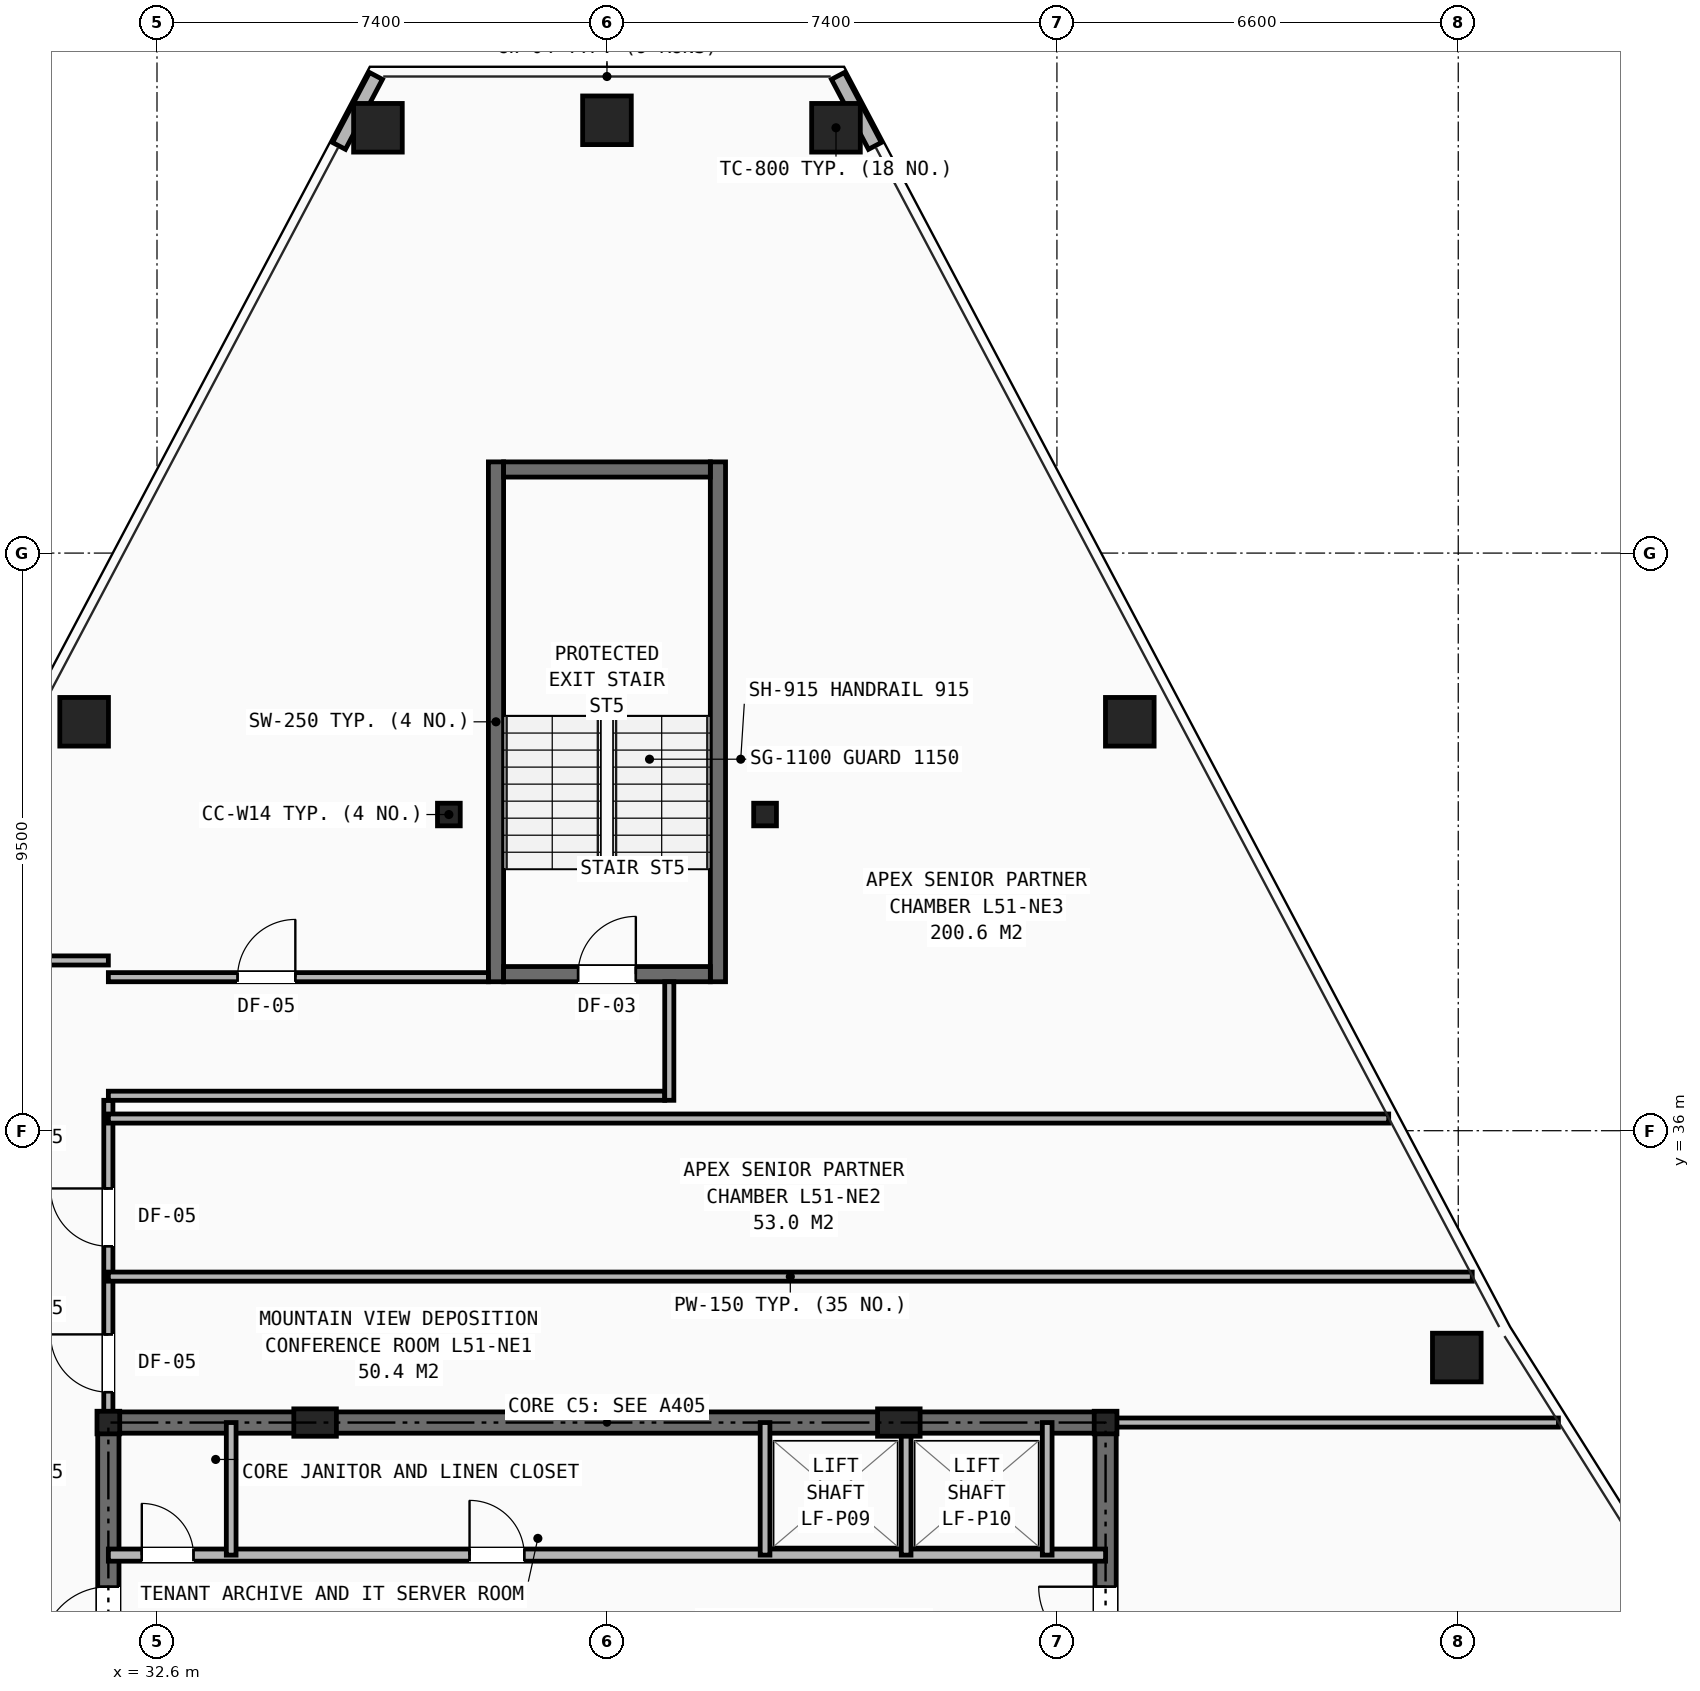
"""IFC4 building model, lengths in metres.
Left out: names, types, materials, properties, quantities, classifications, styles, units other than length and angle.
Written with IfcOpenShell. Run it as: python <this file> out.ifc"""

import sys

from ifc_helpers import new_model, si_unit, direction, frame, frame_2d, origin, origin_2d, place, context, subcontext, project, spatial, rectangle, hollow_rectangle, i_section, extrude, element, fill, save


model = new_model("IFC4")
c1 = context("Model", 3, precision=1e-05, world=origin(), true_north=direction((0.0, 1.0)))
c2 = subcontext(c1, "Body", "Model", "MODEL_VIEW")
j1 = project(units=[si_unit("LENGTHUNIT", "METRE"), si_unit("PLANEANGLEUNIT", "RADIAN")], contexts=[c1])
p1 = place(None, origin())
s1 = spatial("IfcSite", under=j1, at=p1, CompositionType="ELEMENT")
p2 = place(p1, origin())
s2 = spatial("IfcBuilding", under=s1, at=p2, CompositionType="ELEMENT")
p3 = place(p2, frame((0.0, 0.0, 179.25)))
s3 = spatial("IfcBuildingStorey", under=s2, at=p3, CompositionType="ELEMENT", Elevation=179.25)
for number, where, z_axis, x_axis in (
    (1, (31.8, 31.2, 0.0), (0.0, 0.0, 1.0), (1.0, 0.0, 0.0)),
    (2, (48.2, 31.2, 0.0), (0.0, 0.0, 1.0), (1.0, 0.0, 0.0)),
    (3, (37.4, 41.2, 0.0), (0.0, 0.0, 1.0), (1.0, 0.0, 0.0)),
    (4, (42.6, 41.2, 0.0), (0.0, 0.0, 1.0), (1.0, 0.0, 0.0)),
):
    element("IfcColumn", number, at=place(p3, frame(where, z_axis=z_axis, x_axis=x_axis)), inside=s3, PredefinedType="COLUMN", context=c2, shape_type="SweptSolid", body=[
        extrude(i_section(OverallWidth=0.374, OverallDepth=0.372, WebThickness=0.016, FlangeThickness=0.026, at=origin_2d()), origin(), (0.0, 0.0, 1.0), 3.45),
    ])
for number, where, z_axis, x_axis in (
    (5, (35.2, 31.2, 0.0), (0.0, 0.0, 1.0), (1.0, 0.0, 0.0)),
    (6, (44.8, 31.2, 0.0), (0.0, 0.0, 1.0), (1.0, 0.0, 0.0)),
):
    element("IfcColumn", number, at=place(p3, frame(where, z_axis=z_axis, x_axis=x_axis)), inside=s3, PredefinedType="PILASTER", context=c2, shape_type="SweptSolid", body=[
        extrude(rectangle(XDim=0.7, YDim=0.45, at=origin_2d()), origin(), (0.0, 0.0, 1.0), 3.45),
    ])
for number, where, z_axis, x_axis in (
    (7, (43.767, 52.495, 0.0), (0.0, 0.0, 1.0), (1.0, 0.0, 0.0)),
    (8, (40.0, 52.618, 0.0), (0.0, 0.0, 1.0), (1.0, 0.0, 0.0)),
    (9, (36.233, 52.495, 0.0), (0.0, 0.0, 1.0), (1.0, 0.0, 0.0)),
    (10, (31.402, 42.726, 0.0), (0.0, 0.0, 1.0), (1.0, 0.0, 0.0)),
    (11, (53.976, 32.269, 0.0), (0.0, 0.0, 1.0), (1.0, 0.0, 0.0)),
    (12, (48.598, 42.726, 0.0), (0.0, 0.0, 1.0), (1.0, 0.0, 0.0)),
):
    element("IfcColumn", number, at=place(p3, frame(where, z_axis=z_axis, x_axis=x_axis)), inside=s3, PredefinedType="COLUMN", context=c2, shape_type="SweptSolid", body=[
        extrude(hollow_rectangle(XDim=0.8, YDim=0.8, WallThickness=0.055, at=origin_2d()), origin(), (0.0, 0.0, 1.0), 3.45),
    ])
for number, where, z_axis, x_axis in (
    (13, (36.201, 53.347, 0.0), (0.0, 0.0, 1.0), (-0.467, -0.884, 0.0)),
    (14, (44.407, 52.197, 0.0), (0.0, 0.0, 1.0), (-0.467, 0.884, 0.0)),
):
    element("IfcWall", number, at=place(p3, frame(where, z_axis=z_axis, x_axis=x_axis)), inside=s3, PredefinedType="SHEAR", context=c2, shape_type="SweptSolid", body=[
        extrude(rectangle(XDim=1.302, YDim=0.24, at=frame_2d((0.651, 0.0))), origin(), (0.0, 0.0, 1.0), 2.583),
    ])
p4 = place(p3, frame((31.8, 31.2, 0.0), z_axis=(0.0, 0.0, 1.0), x_axis=(1.0, 0.0, 0.0)))
e15 = element("IfcWall", 15, at=p4, inside=s3, PredefinedType="SHEAR", context=c2, shape_type="SweptSolid", body=[
    extrude(rectangle(XDim=16.4, YDim=0.35, at=frame_2d((8.2, 0.0))), origin(), (0.0, 0.0, 1.0), 3.21),
])
p5 = place(p3, frame((31.8, 16.4, 0.0), z_axis=(0.0, 0.0, 1.0), x_axis=(0.0, 1.0, 0.0)))
e16 = element("IfcWall", 16, at=p5, inside=s3, PredefinedType="SHEAR", context=c2, shape_type="SweptSolid", body=[
    extrude(rectangle(XDim=14.8, YDim=0.35, at=frame_2d((7.4, 0.0))), origin(), (0.0, 0.0, 1.0), 3.21),
])
p6 = place(p5, frame((11.0, 0.0, 0.0)))
e17 = element("IfcOpeningElement", 17, at=p6, cuts=e16, PredefinedType="OPENING", context=c2, shape_type="SweptSolid", body=[
    extrude(rectangle(XDim=1.1, YDim=2.15, at=frame_2d((0.55, 1.075))), frame((0.0, 0.185, 0.0), z_axis=(0.0, -1.0, 0.0), x_axis=(1.0, 0.0, 0.0)), (0.0, 0.0, 1.0), 0.37),
])
p7 = place(p3, frame((48.2, 16.4, 0.0), z_axis=(0.0, 0.0, 1.0), x_axis=(0.0, 1.0, 0.0)))
e18 = element("IfcWall", 18, at=p7, inside=s3, PredefinedType="SHEAR", context=c2, shape_type="SweptSolid", body=[
    extrude(rectangle(XDim=14.8, YDim=0.35, at=frame_2d((7.4, 0.0))), origin(), (0.0, 0.0, 1.0), 3.21),
])
p8 = place(p7, frame((11.0, 0.0, 0.0)))
e19 = element("IfcOpeningElement", 19, at=p8, cuts=e18, PredefinedType="OPENING", context=c2, shape_type="SweptSolid", body=[
    extrude(rectangle(XDim=1.1, YDim=2.15, at=frame_2d((0.55, 1.075))), frame((0.0, 0.185, 0.0), z_axis=(0.0, -1.0, 0.0), x_axis=(1.0, 0.0, 0.0)), (0.0, 0.0, 1.0), 0.37),
])
p9 = place(p3, frame((31.8, 29.02, 0.0), z_axis=(0.0, 0.0, 1.0), x_axis=(1.0, 0.0, 0.0)))
e20 = element("IfcWall", 20, at=p9, inside=s3, PredefinedType="SOLIDWALL", context=c2, shape_type="SweptSolid", body=[
    extrude(rectangle(XDim=16.4, YDim=0.2, at=frame_2d((8.2, 0.0))), origin(), (0.0, 0.0, 1.0), 2.665),
])
p10 = place(p9, frame((0.55, 0.0, 0.0)))
e21 = element("IfcOpeningElement", 21, at=p10, cuts=e20, PredefinedType="OPENING", context=c2, shape_type="SweptSolid", body=[
    extrude(rectangle(XDim=0.85, YDim=2.05, at=frame_2d((0.425, 1.025))), frame((0.0, 0.11, 0.0), z_axis=(0.0, -1.0, 0.0), x_axis=(1.0, 0.0, 0.0)), (0.0, 0.0, 1.0), 0.22),
])
p11 = place(p9, frame((5.94, 0.0, 0.0)))
e22 = element("IfcOpeningElement", 22, at=p11, cuts=e20, PredefinedType="OPENING", context=c2, shape_type="SweptSolid", body=[
    extrude(rectangle(XDim=0.9, YDim=2.1, at=frame_2d((0.45, 1.05))), frame((0.0, 0.11, 0.0), z_axis=(0.0, -1.0, 0.0), x_axis=(1.0, 0.0, 0.0)), (0.0, 0.0, 1.0), 0.22),
])
for number, where, z_axis, x_axis in (
    (23, (33.82, 29.02, 0.0), (0.0, 0.0, 1.0), (0.0, 1.0, 0.0)),
    (24, (42.6, 29.02, 0.0), (0.0, 0.0, 1.0), (0.0, 1.0, 0.0)),
    (25, (44.92, 29.02, 0.0), (0.0, 0.0, 1.0), (0.0, 1.0, 0.0)),
    (26, (47.24, 29.02, 0.0), (0.0, 0.0, 1.0), (0.0, 1.0, 0.0)),
):
    element("IfcWall", number, at=place(p3, frame(where, z_axis=z_axis, x_axis=x_axis)), inside=s3, PredefinedType="SOLIDWALL", context=c2, shape_type="SweptSolid", body=[
        extrude(rectangle(XDim=2.18, YDim=0.16, at=frame_2d((1.09, 0.0))), origin(), (0.0, 0.0, 1.0), 2.665),
    ])
p12 = place(p3, frame((31.8, 31.2, 0.0), z_axis=(0.0, 0.0, 1.0), x_axis=(0.0, 1.0, 0.0)))
e27 = element("IfcWall", 27, at=p12, inside=s3, PredefinedType="PARTITIONING", context=c2, shape_type="SweptSolid", body=[
    extrude(rectangle(XDim=5.3, YDim=0.15, at=frame_2d((2.65, 0.0))), origin(), (0.0, 0.0, 1.0), 2.225),
])
p13 = place(p12, frame((0.5, 0.0, 0.0)))
e28 = element("IfcOpeningElement", 28, at=p13, cuts=e27, PredefinedType="OPENING", context=c2, shape_type="SweptSolid", body=[
    extrude(rectangle(XDim=0.95, YDim=2.1, at=frame_2d((0.475, 1.05))), frame((0.0, 0.085, 0.0), z_axis=(0.0, -1.0, 0.0), x_axis=(1.0, 0.0, 0.0)), (0.0, 0.0, 1.0), 0.17),
])
p14 = place(p12, frame((2.9, 0.0, 0.0)))
e29 = element("IfcOpeningElement", 29, at=p14, cuts=e27, PredefinedType="OPENING", context=c2, shape_type="SweptSolid", body=[
    extrude(rectangle(XDim=0.95, YDim=2.1, at=frame_2d((0.475, 1.05))), frame((0.0, 0.085, 0.0), z_axis=(0.0, -1.0, 0.0), x_axis=(1.0, 0.0, 0.0)), (0.0, 0.0, 1.0), 0.17),
])
p15 = place(p3, frame((29.6, 38.8, 0.0), z_axis=(0.0, 0.0, 1.0), x_axis=(1.0, 0.0, 0.0)))
e30 = element("IfcWall", 30, at=p15, inside=s3, PredefinedType="PARTITIONING", context=c2, shape_type="SweptSolid", body=[
    extrude(rectangle(XDim=2.2, YDim=0.15, at=frame_2d((1.1, 0.0))), origin(), (0.0, 0.0, 1.0), 2.589),
])
p16 = place(p3, frame((48.2, 31.2, 0.0), z_axis=(0.0, 0.0, 1.0), x_axis=(1.0, 0.0, 0.0)))
e31 = element("IfcWall", 31, at=p16, inside=s3, PredefinedType="PARTITIONING", context=c2, shape_type="SweptSolid", body=[
    extrude(rectangle(XDim=7.448, YDim=0.15, at=frame_2d((3.724, 0.0))), origin(), (0.0, 0.0, 1.0), 2.225),
])
p17 = place(p3, frame((31.8, 33.6, 0.0), z_axis=(0.0, 0.0, 1.0), x_axis=(1.0, 0.0, 0.0)))
e32 = element("IfcWall", 32, at=p17, inside=s3, PredefinedType="PARTITIONING", context=c2, shape_type="SweptSolid", body=[
    extrude(rectangle(XDim=22.43, YDim=0.15, at=frame_2d((11.215, 0.0))), origin(), (0.0, 0.0, 1.0), 2.589),
])
p18 = place(p3, frame((31.8, 36.2, 0.0), z_axis=(0.0, 0.0, 1.0), x_axis=(1.0, 0.0, 0.0)))
e33 = element("IfcWall", 33, at=p18, inside=s3, PredefinedType="PARTITIONING", context=c2, shape_type="SweptSolid", body=[
    extrude(rectangle(XDim=21.056, YDim=0.15, at=frame_2d((10.528, 0.0))), origin(), (0.0, 0.0, 1.0), 2.589),
])
for number, where, z_axis, x_axis in (
    (34, (38.175, 38.45, 0.0), (0.0, 0.0, 1.0), (0.0, 1.0, 0.0)),
    (35, (41.825, 38.45, 0.0), (0.0, 0.0, 1.0), (0.0, 1.0, 0.0)),
):
    element("IfcWall", number, at=place(p3, frame(where, z_axis=z_axis, x_axis=x_axis)), inside=s3, PredefinedType="SHEAR", context=c2, shape_type="SweptSolid", body=[
        extrude(rectangle(XDim=8.55, YDim=0.25, at=frame_2d((4.275, 0.0))), origin(), (0.0, 0.0, 1.0), 3.21),
    ])
p19 = place(p3, frame((38.3, 38.575, 0.0), z_axis=(0.0, 0.0, 1.0), x_axis=(1.0, 0.0, 0.0)))
e36 = element("IfcWall", 36, at=p19, inside=s3, PredefinedType="SHEAR", context=c2, shape_type="SweptSolid", body=[
    extrude(rectangle(XDim=3.4, YDim=0.25, at=frame_2d((1.7, 0.0))), origin(), (0.0, 0.0, 1.0), 3.21),
])
p20 = place(p19, frame((1.225, 0.0, 0.0)))
e37 = element("IfcOpeningElement", 37, at=p20, cuts=e36, PredefinedType="OPENING", context=c2, shape_type="SweptSolid", body=[
    extrude(rectangle(XDim=0.95, YDim=2.1, at=frame_2d((0.475, 1.05))), frame((0.0, 0.135, 0.0), z_axis=(0.0, -1.0, 0.0), x_axis=(1.0, 0.0, 0.0)), (0.0, 0.0, 1.0), 0.27),
])
p21 = place(p3, frame((38.3, 46.875, 0.0), z_axis=(0.0, 0.0, 1.0), x_axis=(1.0, 0.0, 0.0)))
e38 = element("IfcWall", 38, at=p21, inside=s3, PredefinedType="SHEAR", context=c2, shape_type="SweptSolid", body=[
    extrude(rectangle(XDim=3.4, YDim=0.25, at=frame_2d((1.7, 0.0))), origin(), (0.0, 0.0, 1.0), 3.21),
])
p22 = place(p3, frame((31.8, 36.575, 0.0), z_axis=(0.0, 0.0, 1.0), x_axis=(1.0, 0.0, 0.0)))
e39 = element("IfcWall", 39, at=p22, inside=s3, PredefinedType="PARTITIONING", context=c2, shape_type="SweptSolid", body=[
    extrude(rectangle(XDim=9.15, YDim=0.15, at=frame_2d((4.575, 0.0))), origin(), (0.0, 0.0, 1.0), 3.21),
])
p23 = place(p3, frame((31.8, 38.525, 0.0), z_axis=(0.0, 0.0, 1.0), x_axis=(1.0, 0.0, 0.0)))
e40 = element("IfcWall", 40, at=p23, inside=s3, PredefinedType="PARTITIONING", context=c2, shape_type="SweptSolid", body=[
    extrude(rectangle(XDim=6.25, YDim=0.15, at=frame_2d((3.125, 0.0))), origin(), (0.0, 0.0, 1.0), 2.793),
])
p24 = place(p23, frame((2.125, 0.0, 0.0)))
e41 = element("IfcOpeningElement", 41, at=p24, cuts=e40, PredefinedType="OPENING", context=c2, shape_type="SweptSolid", body=[
    extrude(rectangle(XDim=0.95, YDim=2.1, at=frame_2d((0.475, 1.05))), frame((0.0, 0.085, 0.0), z_axis=(0.0, -1.0, 0.0), x_axis=(1.0, 0.0, 0.0)), (0.0, 0.0, 1.0), 0.17),
])
p25 = place(p3, frame((41.025, 36.5, 0.0), z_axis=(0.0, 0.0, 1.0), x_axis=(0.0, 1.0, 0.0)))
e42 = element("IfcWall", 42, at=p25, inside=s3, PredefinedType="PARTITIONING", context=c2, shape_type="SweptSolid", body=[
    extrude(rectangle(XDim=1.95, YDim=0.15, at=frame_2d((0.975, 0.0))), origin(), (0.0, 0.0, 1.0), 3.21),
])
p26 = place(p10, origin())
e43 = element("IfcDoor", 43, at=p26, inside=s3, OperationType="SINGLE_SWING_LEFT", PredefinedType="DOOR", context=c2, shape_type="SweptSolid", body=[
    extrude(rectangle(XDim=0.85, YDim=2.05, at=frame_2d((0.425, 1.025))), frame((0.0, 0.025, 0.0), z_axis=(0.0, -1.0, 0.0), x_axis=(1.0, 0.0, 0.0)), (0.0, 0.0, 1.0), 0.05),
])
fill(e21, e43)
p27 = place(p6, origin())
e44 = element("IfcDoor", 44, at=p27, inside=s3, OperationType="SINGLE_SWING_LEFT", PredefinedType="DOOR", context=c2, shape_type="SweptSolid", body=[
    extrude(rectangle(XDim=1.1, YDim=2.15, at=frame_2d((0.55, 1.075))), frame((0.0, 0.025, 0.0), z_axis=(0.0, -1.0, 0.0), x_axis=(1.0, 0.0, 0.0)), (0.0, 0.0, 1.0), 0.05),
])
fill(e17, e44)
p28 = place(p8, origin())
e45 = element("IfcDoor", 45, at=p28, inside=s3, OperationType="SINGLE_SWING_RIGHT", PredefinedType="DOOR", context=c2, shape_type="SweptSolid", body=[
    extrude(rectangle(XDim=1.1, YDim=2.15, at=frame_2d((0.55, 1.075))), frame((0.0, 0.025, 0.0), z_axis=(0.0, -1.0, 0.0), x_axis=(1.0, 0.0, 0.0)), (0.0, 0.0, 1.0), 0.05),
])
fill(e19, e45)
p29 = place(p11, origin())
e46 = element("IfcDoor", 46, at=p29, inside=s3, OperationType="SINGLE_SWING_LEFT", PredefinedType="DOOR", context=c2, shape_type="SweptSolid", body=[
    extrude(rectangle(XDim=0.9, YDim=2.1, at=frame_2d((0.45, 1.05))), frame((0.0, 0.025, 0.0), z_axis=(0.0, -1.0, 0.0), x_axis=(1.0, 0.0, 0.0)), (0.0, 0.0, 1.0), 0.05),
])
fill(e22, e46)
p30 = place(p13, origin())
e47 = element("IfcDoor", 47, at=p30, inside=s3, OperationType="SINGLE_SWING_RIGHT", PredefinedType="DOOR", context=c2, shape_type="SweptSolid", body=[
    extrude(rectangle(XDim=0.95, YDim=2.1, at=frame_2d((0.475, 1.05))), frame((0.0, 0.025, 0.0), z_axis=(0.0, -1.0, 0.0), x_axis=(1.0, 0.0, 0.0)), (0.0, 0.0, 1.0), 0.05),
])
fill(e28, e47)
p31 = place(p14, origin())
e48 = element("IfcDoor", 48, at=p31, inside=s3, OperationType="SINGLE_SWING_RIGHT", PredefinedType="DOOR", context=c2, shape_type="SweptSolid", body=[
    extrude(rectangle(XDim=0.95, YDim=2.1, at=frame_2d((0.475, 1.05))), frame((0.0, 0.025, 0.0), z_axis=(0.0, -1.0, 0.0), x_axis=(1.0, 0.0, 0.0)), (0.0, 0.0, 1.0), 0.05),
])
fill(e29, e48)
p32 = place(p24, origin())
e49 = element("IfcDoor", 49, at=p32, inside=s3, OperationType="SINGLE_SWING_RIGHT", PredefinedType="DOOR", context=c2, shape_type="SweptSolid", body=[
    extrude(rectangle(XDim=0.95, YDim=2.1, at=frame_2d((0.475, 1.05))), frame((0.0, 0.025, 0.0), z_axis=(0.0, -1.0, 0.0), x_axis=(1.0, 0.0, 0.0)), (0.0, 0.0, 1.0), 0.05),
])
fill(e41, e49)
p33 = place(p20, origin())
e50 = element("IfcDoor", 50, at=p33, inside=s3, OperationType="SINGLE_SWING_RIGHT", PredefinedType="DOOR", context=c2, shape_type="SweptSolid", body=[
    extrude(rectangle(XDim=0.95, YDim=2.1, at=frame_2d((0.475, 1.05))), frame((0.0, 0.025, 0.0), z_axis=(0.0, -1.0, 0.0), x_axis=(1.0, 0.0, 0.0)), (0.0, 0.0, 1.0), 0.05),
])
fill(e37, e50)
save(model, sys.argv[1])
